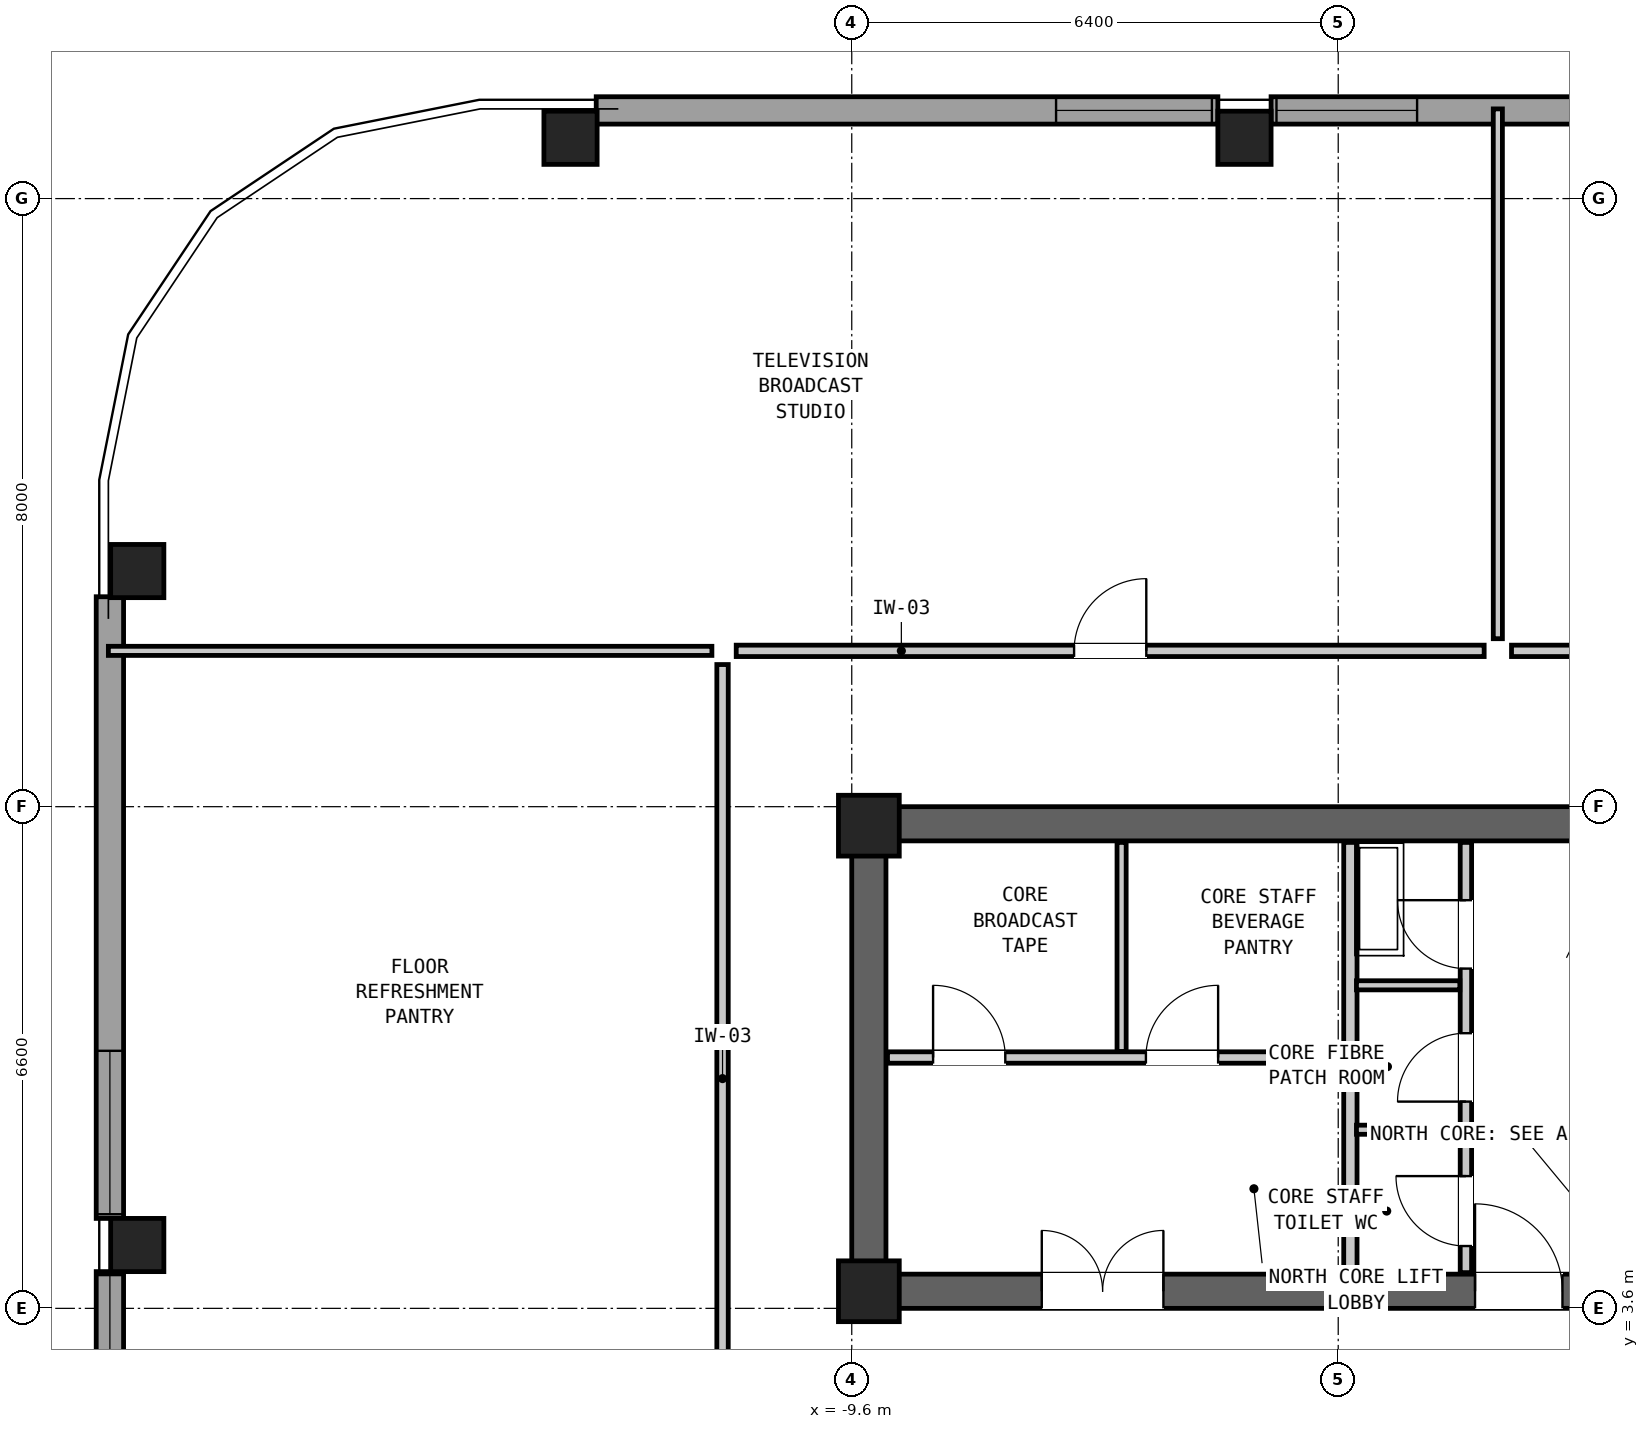
"""IFC4 building model, lengths in metres.
Left out: names, types, materials, properties, quantities, classifications, styles, units other than length and angle.
Written with IfcOpenShell. Run it as: python <this file> out.ifc"""

import sys

from ifc_helpers import new_model, si_unit, direction, frame, frame_2d, origin, origin_2d, place, context, subcontext, project, spatial, rectangle, hollow_rectangle, extrude, element, fill, save


model = new_model("IFC4")
c1 = context("Model", 3, precision=1e-05, world=origin(), true_north=direction((0.0, 1.0)))
c2 = subcontext(c1, "Body", "Model", "MODEL_VIEW")
j1 = project(units=[si_unit("LENGTHUNIT", "METRE"), si_unit("PLANEANGLEUNIT", "RADIAN")], contexts=[c1])
p1 = place(None, origin())
s1 = spatial("IfcSite", under=j1, at=p1, CompositionType="ELEMENT")
p2 = place(p1, origin())
s2 = spatial("IfcBuilding", under=s1, at=p2, CompositionType="ELEMENT")
p3 = place(p2, frame((0.0, 0.0, 199.5)))
s3 = spatial("IfcBuildingStorey", under=s2, at=p3, CompositionType="ELEMENT", Elevation=199.5)
p4 = place(p3, frame((-9.6, 9.975, 0.0), z_axis=(0.0, 0.0, 1.0), x_axis=(1.0, 0.0, 0.0)))
e1 = element("IfcWall", 1, at=p4, inside=s3, PredefinedType="SHEAR", context=c2, shape_type="SweptSolid", body=[
    extrude(rectangle(XDim=19.2, YDim=0.45, at=frame_2d((9.6, 0.0))), origin(), (0.0, 0.0, 1.0), 3.05),
])
p5 = place(p3, frame((-9.6, 3.825, 0.0), z_axis=(0.0, 0.0, 1.0), x_axis=(1.0, 0.0, 0.0)))
e2 = element("IfcWall", 2, at=p5, inside=s3, PredefinedType="SHEAR", context=c2, shape_type="SweptSolid", body=[
    extrude(rectangle(XDim=19.2, YDim=0.45, at=frame_2d((9.6, 0.0))), origin(), (0.0, 0.0, 1.0), 3.05),
])
p6 = place(p5, frame((14.2, 0.0, 0.0)))
e3 = element("IfcOpeningElement", 3, at=p6, cuts=e2, PredefinedType="OPENING", context=c2, shape_type="SweptSolid", body=[
    extrude(rectangle(XDim=1.1, YDim=2.08, at=frame_2d((0.55, 1.04))), frame((0.0, 0.237, 0.0), z_axis=(0.0, -1.0, 0.0), x_axis=(1.0, 0.0, 0.0)), (0.0, 0.0, 1.0), 0.474),
])
p7 = place(p5, frame((8.2, 0.0, 0.0)))
e4 = element("IfcOpeningElement", 4, at=p7, cuts=e2, PredefinedType="OPENING", context=c2, shape_type="SweptSolid", body=[
    extrude(rectangle(XDim=1.15, YDim=2.1, at=frame_2d((0.575, 1.05))), frame((0.0, 0.237, 0.0), z_axis=(0.0, -1.0, 0.0), x_axis=(1.0, 0.0, 0.0)), (0.0, 0.0, 1.0), 0.474),
])
p8 = place(p5, frame((2.5, 0.0, 0.0)))
e5 = element("IfcOpeningElement", 5, at=p8, cuts=e2, PredefinedType="OPENING", context=c2, shape_type="SweptSolid", body=[
    extrude(rectangle(XDim=1.6, YDim=2.12, at=frame_2d((0.8, 1.06))), frame((0.0, 0.237, 0.0), z_axis=(0.0, -1.0, 0.0), x_axis=(1.0, 0.0, 0.0)), (0.0, 0.0, 1.0), 0.474),
])
p9 = place(p3, frame((-9.375, 3.6, 0.0), z_axis=(0.0, 0.0, 1.0), x_axis=(0.0, 1.0, 0.0)))
e6 = element("IfcWall", 6, at=p9, inside=s3, PredefinedType="SHEAR", context=c2, shape_type="SweptSolid", body=[
    extrude(rectangle(XDim=6.6, YDim=0.45, at=frame_2d((3.3, 0.0))), origin(), (0.0, 0.0, 1.0), 3.05),
])
for number, where, z_axis, x_axis in (
    (7, (-4.433, 19.0, 0.0), (0.0, 0.0, 1.0), (1.0, 0.0, 0.0)),
    (8, (-13.3, 19.0, 0.0), (0.0, 0.0, 1.0), (1.0, 0.0, 0.0)),
    (9, (-19.0, 13.3, 0.0), (0.0, 0.0, 1.0), (0.0, 1.0, 0.0)),
    (10, (-19.0, 4.433, 0.0), (0.0, 0.0, 1.0), (0.0, 1.0, 0.0)),
):
    element("IfcColumn", number, at=place(p3, frame(where, z_axis=z_axis, x_axis=x_axis)), inside=s3, PredefinedType="COLUMN", context=c2, shape_type="SweptSolid", body=[
        extrude(hollow_rectangle(XDim=0.7, YDim=0.7, WallThickness=0.045, at=origin_2d()), origin(), (0.0, 0.0, 1.0), 3.05),
    ])
for number, where, z_axis, x_axis in (
    (11, (-9.375, 9.95, 0.0), (0.0, 0.0, 1.0), (1.0, 0.0, 0.0)),
    (12, (-9.375, 3.825, 0.0), (0.0, 0.0, 1.0), (1.0, 0.0, 0.0)),
):
    element("IfcColumn", number, at=place(p3, frame(where, z_axis=z_axis, x_axis=x_axis)), inside=s3, PredefinedType="COLUMN", context=c2, shape_type="SweptSolid", body=[
        extrude(rectangle(XDim=0.8, YDim=0.8, at=origin_2d()), origin(), (0.0, 0.0, 1.0), 3.05),
    ])
p10 = place(p3, frame((-12.962, 19.36, 0.0), z_axis=(0.0, 0.0, 1.0), x_axis=(1.0, 0.0, 0.0)))
e13 = element("IfcWall", 13, at=p10, inside=s3, PredefinedType="SOLIDWALL", context=c2, shape_type="SweptSolid", body=[
    extrude(rectangle(XDim=8.179, YDim=0.36, at=frame_2d((4.089, 0.0))), origin(), (0.0, 0.0, 1.0), 1.662),
])
p11 = place(p10, frame((6.05, 0.0, 0.2)))
e14 = element("IfcOpeningElement", 14, at=p11, cuts=e13, PredefinedType="OPENING", context=c2, shape_type="SweptSolid", body=[
    extrude(rectangle(XDim=2.05, YDim=1.0, at=frame_2d((1.025, 0.5))), frame((0.0, 0.192, 0.0), z_axis=(0.0, -1.0, 0.0), x_axis=(1.0, 0.0, 0.0)), (0.0, 0.0, 1.0), 0.384),
])
p12 = place(p3, frame((-4.083, 19.36, 0.0), z_axis=(0.0, 0.0, 1.0), x_axis=(1.0, 0.0, 0.0)))
e15 = element("IfcWall", 15, at=p12, inside=s3, PredefinedType="SOLIDWALL", context=c2, shape_type="SweptSolid", body=[
    extrude(rectangle(XDim=8.167, YDim=0.36, at=frame_2d((4.083, 0.0))), origin(), (0.0, 0.0, 1.0), 1.662),
])
p13 = place(p12, frame((0.071, 0.0, 0.2)))
e16 = element("IfcOpeningElement", 16, at=p13, cuts=e15, PredefinedType="OPENING", context=c2, shape_type="SweptSolid", body=[
    extrude(rectangle(XDim=1.85, YDim=0.9, at=frame_2d((0.925, 0.45))), frame((0.0, 0.192, 0.0), z_axis=(0.0, -1.0, 0.0), x_axis=(1.0, 0.0, 0.0)), (0.0, 0.0, 1.0), 0.384),
])
p14 = place(p12, frame((6.221, 0.0, 0.2)))
e17 = element("IfcOpeningElement", 17, at=p14, cuts=e15, PredefinedType="OPENING", context=c2, shape_type="SweptSolid", body=[
    extrude(rectangle(XDim=1.75, YDim=0.9, at=frame_2d((0.875, 0.45))), frame((0.0, 0.192, 0.0), z_axis=(0.0, -1.0, 0.0), x_axis=(1.0, 0.0, 0.0)), (0.0, 0.0, 1.0), 0.384),
])
p15 = place(p3, frame((-19.36, -4.083, 0.0), z_axis=(0.0, 0.0, 1.0), x_axis=(0.0, 1.0, 0.0)))
e18 = element("IfcWall", 18, at=p15, inside=s3, PredefinedType="SOLIDWALL", context=c2, shape_type="SweptSolid", body=[
    extrude(rectangle(XDim=8.167, YDim=0.36, at=frame_2d((4.083, 0.0))), origin(), (0.0, 0.0, 1.0), 1.662),
])
p16 = place(p15, frame((0.221, 0.0, 0.2)))
e19 = element("IfcOpeningElement", 19, at=p16, cuts=e18, PredefinedType="OPENING", context=c2, shape_type="SweptSolid", body=[
    extrude(rectangle(XDim=1.9, YDim=0.9, at=frame_2d((0.95, 0.45))), frame((0.0, 0.192, 0.0), z_axis=(0.0, -1.0, 0.0), x_axis=(1.0, 0.0, 0.0)), (0.0, 0.0, 1.0), 0.384),
])
p17 = place(p15, frame((6.321, 0.0, 0.2)))
e20 = element("IfcOpeningElement", 20, at=p17, cuts=e18, PredefinedType="OPENING", context=c2, shape_type="SweptSolid", body=[
    extrude(rectangle(XDim=1.8, YDim=1.05, at=frame_2d((0.9, 0.525))), frame((0.0, 0.192, 0.0), z_axis=(0.0, -1.0, 0.0), x_axis=(1.0, 0.0, 0.0)), (0.0, 0.0, 1.0), 0.384),
])
p18 = place(p3, frame((-19.36, 4.783, 0.0), z_axis=(0.0, 0.0, 1.0), x_axis=(0.0, 1.0, 0.0)))
e21 = element("IfcWall", 21, at=p18, inside=s3, PredefinedType="SOLIDWALL", context=c2, shape_type="SweptSolid", body=[
    extrude(rectangle(XDim=8.179, YDim=0.36, at=frame_2d((4.089, 0.0))), origin(), (0.0, 0.0, 1.0), 1.662),
])
p19 = place(p18, frame((0.055, 0.0, 0.2)))
e22 = element("IfcOpeningElement", 22, at=p19, cuts=e21, PredefinedType="OPENING", context=c2, shape_type="SweptSolid", body=[
    extrude(rectangle(XDim=2.15, YDim=1.05, at=frame_2d((1.075, 0.525))), frame((0.0, 0.192, 0.0), z_axis=(0.0, -1.0, 0.0), x_axis=(1.0, 0.0, 0.0)), (0.0, 0.0, 1.0), 0.384),
])
p20 = place(p3, frame((-3.04, 4.07, 0.0), z_axis=(0.0, 0.0, 1.0), x_axis=(0.0, 1.0, 0.0)))
e23 = element("IfcWall", 23, at=p20, inside=s3, PredefinedType="PARTITIONING", context=c2, shape_type="SweptSolid", body=[
    extrude(rectangle(XDim=5.66, YDim=0.175, at=frame_2d((2.83, 0.0))), origin(), (0.0, 0.0, 1.0), 2.86),
])
p21 = place(p3, frame((-1.52, 4.07, 0.0), z_axis=(0.0, 0.0, 1.0), x_axis=(0.0, 1.0, 0.0)))
e24 = element("IfcWall", 24, at=p21, inside=s3, PredefinedType="PARTITIONING", context=c2, shape_type="SweptSolid", body=[
    extrude(rectangle(XDim=5.66, YDim=0.15, at=frame_2d((2.83, 0.0))), origin(), (0.0, 0.0, 1.0), 2.86),
])
p22 = place(p21, frame((4.0, 0.0, 0.0)))
e25 = element("IfcOpeningElement", 25, at=p22, cuts=e24, PredefinedType="OPENING", context=c2, shape_type="SweptSolid", body=[
    extrude(rectangle(XDim=0.9, YDim=2.05, at=frame_2d((0.45, 1.025))), frame((0.0, 0.087, 0.0), z_axis=(0.0, -1.0, 0.0), x_axis=(1.0, 0.0, 0.0)), (0.0, 0.0, 1.0), 0.174),
])
p23 = place(p21, frame((2.25, 0.0, 0.0)))
e26 = element("IfcOpeningElement", 26, at=p23, cuts=e24, PredefinedType="OPENING", context=c2, shape_type="SweptSolid", body=[
    extrude(rectangle(XDim=0.9, YDim=2.05, at=frame_2d((0.45, 1.025))), frame((0.0, 0.087, 0.0), z_axis=(0.0, -1.0, 0.0), x_axis=(1.0, 0.0, 0.0)), (0.0, 0.0, 1.0), 0.174),
])
p24 = place(p21, frame((0.35, 0.0, 0.0)))
e27 = element("IfcOpeningElement", 27, at=p24, cuts=e24, PredefinedType="OPENING", context=c2, shape_type="SweptSolid", body=[
    extrude(rectangle(XDim=0.92, YDim=2.1, at=frame_2d((0.46, 1.05))), frame((0.0, 0.087, 0.0), z_axis=(0.0, -1.0, 0.0), x_axis=(1.0, 0.0, 0.0)), (0.0, 0.0, 1.0), 0.174),
])
for number, where, z_axis, x_axis in (
    (28, (-2.96, 5.95, 0.0), (0.0, 0.0, 1.0), (1.0, 0.0, 0.0)),
    (29, (-2.96, 7.85, 0.0), (0.0, 0.0, 1.0), (1.0, 0.0, 0.0)),
):
    element("IfcWall", number, at=place(p3, frame(where, z_axis=z_axis, x_axis=x_axis)), inside=s3, PredefinedType="PARTITIONING", context=c2, shape_type="SweptSolid", body=[
        extrude(rectangle(XDim=1.36, YDim=0.12, at=frame_2d((0.68, 0.0))), origin(), (0.0, 0.0, 1.0), 2.86),
    ])
p25 = place(p3, frame((-9.13, 6.9, 0.0), z_axis=(0.0, 0.0, 1.0), x_axis=(1.0, 0.0, 0.0)))
e30 = element("IfcWall", 30, at=p25, inside=s3, PredefinedType="PARTITIONING", context=c2, shape_type="SweptSolid", body=[
    extrude(rectangle(XDim=6.01, YDim=0.15, at=frame_2d((3.005, 0.0))), origin(), (0.0, 0.0, 1.0), 2.86),
])
p26 = place(p25, frame((0.6, 0.0, 0.0)))
e31 = element("IfcOpeningElement", 31, at=p26, cuts=e30, PredefinedType="OPENING", context=c2, shape_type="SweptSolid", body=[
    extrude(rectangle(XDim=0.95, YDim=2.1, at=frame_2d((0.475, 1.05))), frame((0.0, 0.087, 0.0), z_axis=(0.0, -1.0, 0.0), x_axis=(1.0, 0.0, 0.0)), (0.0, 0.0, 1.0), 0.174),
])
p27 = place(p25, frame((3.4, 0.0, 0.0)))
e32 = element("IfcOpeningElement", 32, at=p27, cuts=e30, PredefinedType="OPENING", context=c2, shape_type="SweptSolid", body=[
    extrude(rectangle(XDim=0.95, YDim=2.1, at=frame_2d((0.475, 1.05))), frame((0.0, 0.087, 0.0), z_axis=(0.0, -1.0, 0.0), x_axis=(1.0, 0.0, 0.0)), (0.0, 0.0, 1.0), 0.174),
])
p28 = place(p3, frame((-6.05, 6.98, 0.0), z_axis=(0.0, 0.0, 1.0), x_axis=(0.0, 1.0, 0.0)))
e33 = element("IfcWall", 33, at=p28, inside=s3, PredefinedType="PARTITIONING", context=c2, shape_type="SweptSolid", body=[
    extrude(rectangle(XDim=2.75, YDim=0.12, at=frame_2d((1.375, 0.0))), origin(), (0.0, 0.0, 1.0), 2.86),
])
p29 = place(p3, frame((-19.38, 12.25, 0.0), z_axis=(0.0, 0.0, 1.0), x_axis=(1.0, 0.0, 0.0)))
e34 = element("IfcWall", 34, at=p29, inside=s3, PredefinedType="PARTITIONING", context=c2, shape_type="SweptSolid", body=[
    extrude(rectangle(XDim=7.94, YDim=0.12, at=frame_2d((3.97, 0.0))), origin(), (0.0, 0.0, 1.0), 2.86),
])
p30 = place(p3, frame((-1.1, 12.41, 0.0), z_axis=(0.0, 0.0, 1.0), x_axis=(0.0, 1.0, 0.0)))
e35 = element("IfcWall", 35, at=p30, inside=s3, PredefinedType="PARTITIONING", context=c2, shape_type="SweptSolid", body=[
    extrude(rectangle(XDim=6.97, YDim=0.12, at=frame_2d((3.485, 0.0))), origin(), (0.0, 0.0, 1.0), 2.86),
])
p31 = place(p3, frame((-11.12, 12.25, 0.0), z_axis=(0.0, 0.0, 1.0), x_axis=(1.0, 0.0, 0.0)))
e36 = element("IfcWall", 36, at=p31, inside=s3, PredefinedType="PARTITIONING", context=c2, shape_type="SweptSolid", body=[
    extrude(rectangle(XDim=9.84, YDim=0.15, at=frame_2d((4.92, 0.0))), origin(), (0.0, 0.0, 1.0), 2.86),
])
p32 = place(p31, frame((4.445, 0.0, 0.0)))
e37 = element("IfcOpeningElement", 37, at=p32, cuts=e36, PredefinedType="OPENING", context=c2, shape_type="SweptSolid", body=[
    extrude(rectangle(XDim=0.95, YDim=2.1, at=frame_2d((0.475, 1.05))), frame((0.0, 0.087, 0.0), z_axis=(0.0, -1.0, 0.0), x_axis=(1.0, 0.0, 0.0)), (0.0, 0.0, 1.0), 0.174),
])
p33 = place(p3, frame((-0.92, 12.25, 0.0), z_axis=(0.0, 0.0, 1.0), x_axis=(1.0, 0.0, 0.0)))
e38 = element("IfcWall", 38, at=p33, inside=s3, PredefinedType="PARTITIONING", context=c2, shape_type="SweptSolid", body=[
    extrude(rectangle(XDim=12.39, YDim=0.15, at=frame_2d((6.195, 0.0))), origin(), (0.0, 0.0, 1.0), 2.86),
])
p34 = place(p33, frame((5.72, 0.0, 0.0)))
e39 = element("IfcOpeningElement", 39, at=p34, cuts=e38, PredefinedType="OPENING", context=c2, shape_type="SweptSolid", body=[
    extrude(rectangle(XDim=0.95, YDim=2.1, at=frame_2d((0.475, 1.05))), frame((0.0, 0.087, 0.0), z_axis=(0.0, -1.0, 0.0), x_axis=(1.0, 0.0, 0.0)), (0.0, 0.0, 1.0), 0.174),
])
p35 = place(p3, frame((-11.3, -10.87, 0.0), z_axis=(0.0, 0.0, 1.0), x_axis=(0.0, 1.0, 0.0)))
e40 = element("IfcWall", 40, at=p35, inside=s3, PredefinedType="PARTITIONING", context=c2, shape_type="SweptSolid", body=[
    extrude(rectangle(XDim=22.94, YDim=0.15, at=frame_2d((11.47, 0.0))), origin(), (0.0, 0.0, 1.0), 2.86),
])
p36 = place(p35, frame((10.995, 0.0, 0.0)))
e41 = element("IfcOpeningElement", 41, at=p36, cuts=e40, PredefinedType="OPENING", context=c2, shape_type="SweptSolid", body=[
    extrude(rectangle(XDim=0.95, YDim=2.1, at=frame_2d((0.475, 1.05))), frame((0.0, 0.087, 0.0), z_axis=(0.0, -1.0, 0.0), x_axis=(1.0, 0.0, 0.0)), (0.0, 0.0, 1.0), 0.174),
])
p37 = place(p11, origin())
e42 = element("IfcWindow", 42, at=p37, inside=s3, PartitioningType="SINGLE_PANEL", PredefinedType="WINDOW", context=c2, shape_type="SweptSolid", body=[
    extrude(rectangle(XDim=2.05, YDim=1.0, at=frame_2d((1.025, 0.5))), frame((0.0, 0.03, 0.0), z_axis=(0.0, -1.0, 0.0), x_axis=(1.0, 0.0, 0.0)), (0.0, 0.0, 1.0), 0.06),
])
fill(e14, e42)
p38 = place(p13, origin())
e43 = element("IfcWindow", 43, at=p38, inside=s3, PartitioningType="SINGLE_PANEL", PredefinedType="WINDOW", context=c2, shape_type="SweptSolid", body=[
    extrude(rectangle(XDim=1.85, YDim=0.9, at=frame_2d((0.925, 0.45))), frame((0.0, 0.03, 0.0), z_axis=(0.0, -1.0, 0.0), x_axis=(1.0, 0.0, 0.0)), (0.0, 0.0, 1.0), 0.06),
])
fill(e16, e43)
p39 = place(p17, origin())
e44 = element("IfcWindow", 44, at=p39, inside=s3, PartitioningType="SINGLE_PANEL", PredefinedType="WINDOW", context=c2, shape_type="SweptSolid", body=[
    extrude(rectangle(XDim=1.8, YDim=1.05, at=frame_2d((0.9, 0.525))), frame((0.0, 0.03, 0.0), z_axis=(0.0, -1.0, 0.0), x_axis=(1.0, 0.0, 0.0)), (0.0, 0.0, 1.0), 0.06),
])
fill(e20, e44)
p40 = place(p19, origin())
e45 = element("IfcWindow", 45, at=p40, inside=s3, PartitioningType="SINGLE_PANEL", PredefinedType="WINDOW", context=c2, shape_type="SweptSolid", body=[
    extrude(rectangle(XDim=2.15, YDim=1.05, at=frame_2d((1.075, 0.525))), frame((0.0, 0.03, 0.0), z_axis=(0.0, -1.0, 0.0), x_axis=(1.0, 0.0, 0.0)), (0.0, 0.0, 1.0), 0.06),
])
fill(e22, e45)
p41 = place(p7, origin())
e46 = element("IfcDoor", 46, at=p41, inside=s3, OperationType="SINGLE_SWING_LEFT", PredefinedType="DOOR", context=c2, shape_type="SweptSolid", body=[
    extrude(rectangle(XDim=1.15, YDim=2.1, at=frame_2d((0.575, 1.05))), frame((0.0, 0.025, 0.0), z_axis=(0.0, -1.0, 0.0), x_axis=(1.0, 0.0, 0.0)), (0.0, 0.0, 1.0), 0.05),
])
fill(e4, e46)
p42 = place(p22, origin())
e47 = element("IfcDoor", 47, at=p42, inside=s3, OperationType="SINGLE_SWING_RIGHT", PredefinedType="DOOR", context=c2, shape_type="SweptSolid", body=[
    extrude(rectangle(XDim=0.9, YDim=2.05, at=frame_2d((0.45, 1.025))), frame((0.0, 0.025, 0.0), z_axis=(0.0, -1.0, 0.0), x_axis=(1.0, 0.0, 0.0)), (0.0, 0.0, 1.0), 0.05),
])
fill(e25, e47)
p43 = place(p23, origin())
e48 = element("IfcDoor", 48, at=p43, inside=s3, OperationType="SINGLE_SWING_LEFT", PredefinedType="DOOR", context=c2, shape_type="SweptSolid", body=[
    extrude(rectangle(XDim=0.9, YDim=2.05, at=frame_2d((0.45, 1.025))), frame((0.0, 0.025, 0.0), z_axis=(0.0, -1.0, 0.0), x_axis=(1.0, 0.0, 0.0)), (0.0, 0.0, 1.0), 0.05),
])
fill(e26, e48)
p44 = place(p24, origin())
e49 = element("IfcDoor", 49, at=p44, inside=s3, OperationType="SINGLE_SWING_RIGHT", PredefinedType="DOOR", context=c2, shape_type="SweptSolid", body=[
    extrude(rectangle(XDim=0.92, YDim=2.1, at=frame_2d((0.46, 1.05))), frame((0.0, 0.025, 0.0), z_axis=(0.0, -1.0, 0.0), x_axis=(1.0, 0.0, 0.0)), (0.0, 0.0, 1.0), 0.05),
])
fill(e27, e49)
p45 = place(p8, origin())
e50 = element("IfcDoor", 50, at=p45, inside=s3, OperationType="DOUBLE_DOOR_SINGLE_SWING", PredefinedType="DOOR", context=c2, shape_type="SweptSolid", body=[
    extrude(rectangle(XDim=1.6, YDim=2.12, at=frame_2d((0.8, 1.06))), frame((0.0, 0.025, 0.0), z_axis=(0.0, -1.0, 0.0), x_axis=(1.0, 0.0, 0.0)), (0.0, 0.0, 1.0), 0.05),
])
fill(e5, e50)
p46 = place(p26, origin())
e51 = element("IfcDoor", 51, at=p46, inside=s3, OperationType="SINGLE_SWING_LEFT", PredefinedType="DOOR", context=c2, shape_type="SweptSolid", body=[
    extrude(rectangle(XDim=0.95, YDim=2.1, at=frame_2d((0.475, 1.05))), frame((0.0, 0.025, 0.0), z_axis=(0.0, -1.0, 0.0), x_axis=(1.0, 0.0, 0.0)), (0.0, 0.0, 1.0), 0.05),
])
fill(e31, e51)
p47 = place(p27, origin())
e52 = element("IfcDoor", 52, at=p47, inside=s3, OperationType="SINGLE_SWING_RIGHT", PredefinedType="DOOR", context=c2, shape_type="SweptSolid", body=[
    extrude(rectangle(XDim=0.95, YDim=2.1, at=frame_2d((0.475, 1.05))), frame((0.0, 0.025, 0.0), z_axis=(0.0, -1.0, 0.0), x_axis=(1.0, 0.0, 0.0)), (0.0, 0.0, 1.0), 0.05),
])
fill(e32, e52)
p48 = place(p32, origin())
e53 = element("IfcDoor", 53, at=p48, inside=s3, OperationType="SINGLE_SWING_RIGHT", PredefinedType="DOOR", context=c2, shape_type="SweptSolid", body=[
    extrude(rectangle(XDim=0.95, YDim=2.1, at=frame_2d((0.475, 1.05))), frame((0.0, 0.025, 0.0), z_axis=(0.0, -1.0, 0.0), x_axis=(1.0, 0.0, 0.0)), (0.0, 0.0, 1.0), 0.05),
])
fill(e37, e53)
save(model, sys.argv[1])
